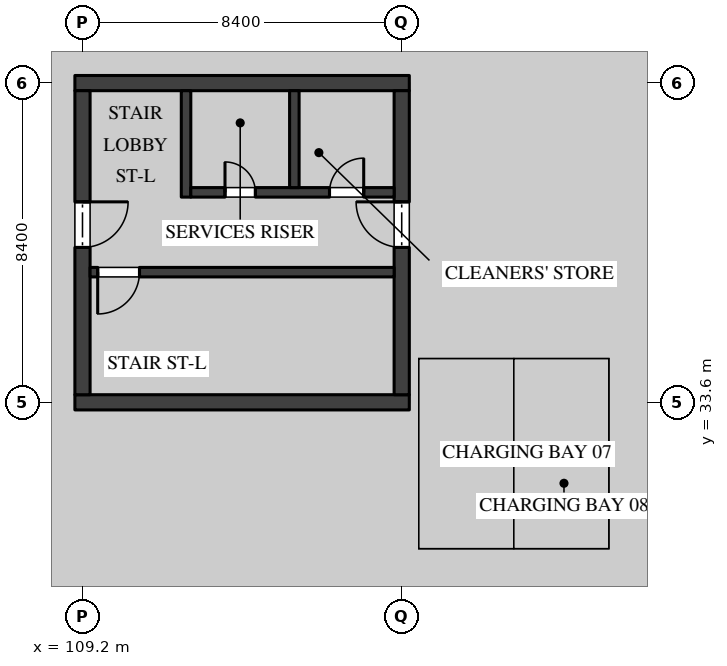
"""IFC4 building model, lengths in metres.
Left out: names, types, materials, properties, quantities, classifications, styles, units other than length and angle.
Written with IfcOpenShell. Run it as: python <this file> out.ifc"""

import sys

from ifc_helpers import new_model, si_unit, direction, frame, frame_2d, origin, place, context, subcontext, project, spatial, rectangle, extrude, element, fill, save


model = new_model("IFC4")
c1 = context("Model", 3, precision=1e-05, world=origin(), true_north=direction((0.0, 1.0)))
c2 = subcontext(c1, "Body", "Model", "MODEL_VIEW")
j1 = project(units=[si_unit("LENGTHUNIT", "METRE"), si_unit("PLANEANGLEUNIT", "RADIAN")], contexts=[c1])
p1 = place(None, origin())
s1 = spatial("IfcSite", under=j1, at=p1, CompositionType="ELEMENT")
p2 = place(p1, origin())
s2 = spatial("IfcBuilding", under=s1, at=p2, CompositionType="ELEMENT")
p3 = place(p2, frame((0.0, 0.0, -4.5)))
s3 = spatial("IfcBuildingStorey", under=s2, at=p3, CompositionType="ELEMENT", Elevation=-4.5)
for number, where, z_axis, x_axis in (
    (1, (109.0, 33.6, 0.0), (0.0, 0.0, 1.0), (1.0, 0.0, 0.0)),
    (2, (109.0, 42.0, 0.0), (0.0, 0.0, 1.0), (1.0, 0.0, 0.0)),
):
    element("IfcWall", number, at=place(p3, frame(where, z_axis=z_axis, x_axis=x_axis)), inside=s3, PredefinedType="SHEAR", context=c2, shape_type="SweptSolid", body=[
        extrude(rectangle(XDim=8.8, YDim=0.4, at=frame_2d((4.4, 0.0))), origin(), (0.0, 0.0, 1.0), 4.05),
    ])
p4 = place(p3, frame((109.2, 33.8, 0.0), z_axis=(0.0, 0.0, 1.0), x_axis=(0.0, 1.0, 0.0)))
e3 = element("IfcWall", 3, at=p4, inside=s3, PredefinedType="SHEAR", context=c2, shape_type="SweptSolid", body=[
    extrude(rectangle(XDim=8.0, YDim=0.4, at=frame_2d((4.0, 0.0))), origin(), (0.0, 0.0, 1.0), 4.05),
])
p5 = place(p4, frame((3.875, 0.0, 0.0)))
e4 = element("IfcOpeningElement", 4, at=p5, cuts=e3, PredefinedType="OPENING", context=c2, shape_type="SweptSolid", body=[
    extrude(rectangle(XDim=1.2, YDim=2.1, at=frame_2d((0.6, 1.05))), frame((0.0, 0.21, 0.0), z_axis=(0.0, -1.0, 0.0), x_axis=(1.0, 0.0, 0.0)), (0.0, 0.0, 1.0), 0.42),
])
p6 = place(p3, frame((117.6, 33.8, 0.0), z_axis=(0.0, 0.0, 1.0), x_axis=(0.0, 1.0, 0.0)))
e5 = element("IfcWall", 5, at=p6, inside=s3, PredefinedType="SHEAR", context=c2, shape_type="SweptSolid", body=[
    extrude(rectangle(XDim=8.0, YDim=0.4, at=frame_2d((4.0, 0.0))), origin(), (0.0, 0.0, 1.0), 4.05),
])
p7 = place(p6, frame((3.875, 0.0, 0.0)))
e6 = element("IfcOpeningElement", 6, at=p7, cuts=e5, PredefinedType="OPENING", context=c2, shape_type="SweptSolid", body=[
    extrude(rectangle(XDim=1.2, YDim=2.1, at=frame_2d((0.6, 1.05))), frame((0.0, 0.21, 0.0), z_axis=(0.0, -1.0, 0.0), x_axis=(1.0, 0.0, 0.0)), (0.0, 0.0, 1.0), 0.42),
])
p8 = place(p3, frame((109.4, 37.025, 0.0), z_axis=(0.0, 0.0, 1.0), x_axis=(1.0, 0.0, 0.0)))
e7 = element("IfcWall", 7, at=p8, inside=s3, PredefinedType="SOLIDWALL", context=c2, shape_type="SweptSolid", body=[
    extrude(rectangle(XDim=8.0, YDim=0.25, at=frame_2d((4.0, 0.0))), origin(), (0.0, 0.0, 1.0), 4.05),
])
p9 = place(p8, frame((0.2, 0.0, 0.0)))
e8 = element("IfcOpeningElement", 8, at=p9, cuts=e7, PredefinedType="OPENING", context=c2, shape_type="SweptSolid", body=[
    extrude(rectangle(XDim=1.1, YDim=2.1, at=frame_2d((0.55, 1.05))), frame((0.0, 0.135, 0.0), z_axis=(0.0, -1.0, 0.0), x_axis=(1.0, 0.0, 0.0)), (0.0, 0.0, 1.0), 0.27),
])
p10 = place(p3, frame((111.925, 39.0, 0.0), z_axis=(0.0, 0.0, 1.0), x_axis=(0.0, 1.0, 0.0)))
e9 = element("IfcWall", 9, at=p10, inside=s3, PredefinedType="SOLIDWALL", context=c2, shape_type="SweptSolid", body=[
    extrude(rectangle(XDim=2.8, YDim=0.25, at=frame_2d((1.4, 0.0))), origin(), (0.0, 0.0, 1.0), 4.05),
])
p11 = place(p3, frame((112.05, 39.125, 0.0), z_axis=(0.0, 0.0, 1.0), x_axis=(1.0, 0.0, 0.0)))
e10 = element("IfcWall", 10, at=p11, inside=s3, PredefinedType="SOLIDWALL", context=c2, shape_type="SweptSolid", body=[
    extrude(rectangle(XDim=5.35, YDim=0.25, at=frame_2d((2.675, 0.0))), origin(), (0.0, 0.0, 1.0), 4.05),
])
p12 = place(p11, frame((3.65, 0.0, 0.0)))
e11 = element("IfcOpeningElement", 11, at=p12, cuts=e10, PredefinedType="OPENING", context=c2, shape_type="SweptSolid", body=[
    extrude(rectangle(XDim=0.9, YDim=2.1, at=frame_2d((0.45, 1.05))), frame((0.0, 0.135, 0.0), z_axis=(0.0, -1.0, 0.0), x_axis=(1.0, 0.0, 0.0)), (0.0, 0.0, 1.0), 0.27),
])
p13 = place(p11, frame((0.9, 0.0, 0.0)))
e12 = element("IfcOpeningElement", 12, at=p13, cuts=e10, PredefinedType="OPENING", context=c2, shape_type="SweptSolid", body=[
    extrude(rectangle(XDim=0.8, YDim=2.1, at=frame_2d((0.4, 1.05))), frame((0.0, 0.135, 0.0), z_axis=(0.0, -1.0, 0.0), x_axis=(1.0, 0.0, 0.0)), (0.0, 0.0, 1.0), 0.27),
])
p14 = place(p3, frame((114.775, 39.25, 0.0), z_axis=(0.0, 0.0, 1.0), x_axis=(0.0, 1.0, 0.0)))
e13 = element("IfcWall", 13, at=p14, inside=s3, PredefinedType="SOLIDWALL", context=c2, shape_type="SweptSolid", body=[
    extrude(rectangle(XDim=2.55, YDim=0.25, at=frame_2d((1.275, 0.0))), origin(), (0.0, 0.0, 1.0), 4.05),
])
p15 = place(p12, origin())
e14 = element("IfcDoor", 14, at=p15, inside=s3, OperationType="SINGLE_SWING_LEFT", PredefinedType="DOOR", context=c2, shape_type="SweptSolid", body=[
    extrude(rectangle(XDim=0.9, YDim=2.1, at=frame_2d((0.45, 1.05))), frame((0.0, 0.035, 0.0), z_axis=(0.0, -1.0, 0.0), x_axis=(1.0, 0.0, 0.0)), (0.0, 0.0, 1.0), 0.07),
])
fill(e11, e14)
p16 = place(p5, frame((1.2, 0.0, 0.0), z_axis=(0.0, 0.0, 1.0), x_axis=(-1.0, 0.0, 0.0)))
e15 = element("IfcDoor", 15, at=p16, inside=s3, OperationType="SINGLE_SWING_RIGHT", PredefinedType="DOOR", context=c2, shape_type="SweptSolid", body=[
    extrude(rectangle(XDim=1.2, YDim=2.1, at=frame_2d((0.6, 1.05))), frame((0.0, 0.035, 0.0), z_axis=(0.0, -1.0, 0.0), x_axis=(1.0, 0.0, 0.0)), (0.0, 0.0, 1.0), 0.07),
])
fill(e4, e15)
p17 = place(p7, origin())
e16 = element("IfcDoor", 16, at=p17, inside=s3, OperationType="SINGLE_SWING_LEFT", PredefinedType="DOOR", context=c2, shape_type="SweptSolid", body=[
    extrude(rectangle(XDim=1.2, YDim=2.1, at=frame_2d((0.6, 1.05))), frame((0.0, 0.035, 0.0), z_axis=(0.0, -1.0, 0.0), x_axis=(1.0, 0.0, 0.0)), (0.0, 0.0, 1.0), 0.07),
])
fill(e6, e16)
p18 = place(p13, origin())
e17 = element("IfcDoor", 17, at=p18, inside=s3, OperationType="SINGLE_SWING_RIGHT", PredefinedType="DOOR", context=c2, shape_type="SweptSolid", body=[
    extrude(rectangle(XDim=0.8, YDim=2.1, at=frame_2d((0.4, 1.05))), frame((0.0, 0.035, 0.0), z_axis=(0.0, -1.0, 0.0), x_axis=(1.0, 0.0, 0.0)), (0.0, 0.0, 1.0), 0.07),
])
fill(e12, e17)
p19 = place(p9, frame((1.1, 0.0, 0.0), z_axis=(0.0, 0.0, 1.0), x_axis=(-1.0, 0.0, 0.0)))
e18 = element("IfcDoor", 18, at=p19, inside=s3, OperationType="SINGLE_SWING_LEFT", PredefinedType="DOOR", context=c2, shape_type="SweptSolid", body=[
    extrude(rectangle(XDim=1.1, YDim=2.1, at=frame_2d((0.55, 1.05))), frame((0.0, 0.035, 0.0), z_axis=(0.0, -1.0, 0.0), x_axis=(1.0, 0.0, 0.0)), (0.0, 0.0, 1.0), 0.07),
])
fill(e8, e18)
save(model, sys.argv[1])
